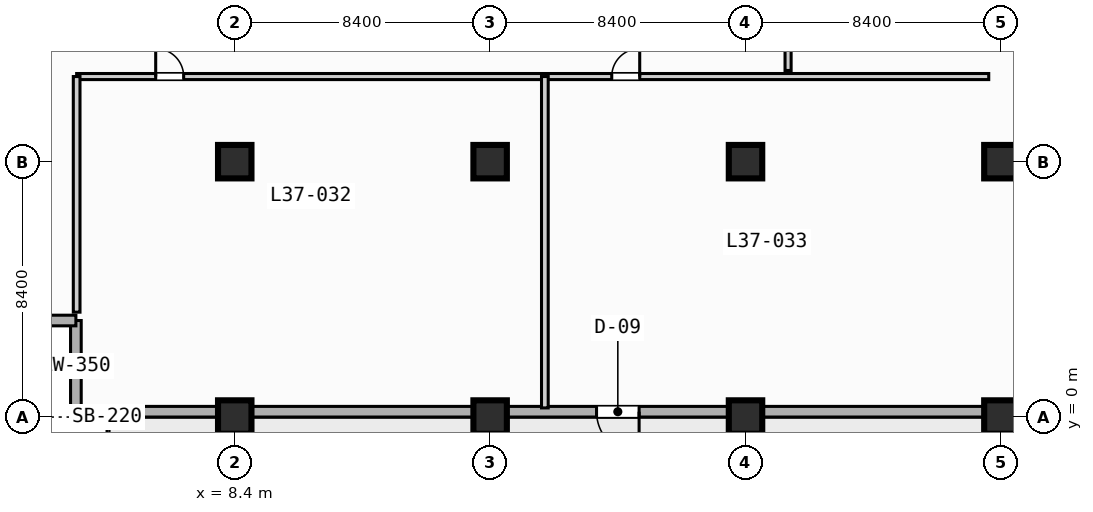
"""IFC4 building model, lengths in metres.
Left out: names, types, materials, properties, quantities, classifications, styles, units other than length and angle.
Written with IfcOpenShell. Run it as: python <this file> out.ifc"""

import sys

from ifc_helpers import new_model, si_unit, direction, frame, frame_2d, origin, origin_2d, place, context, subcontext, project, spatial, rectangle, extrude, element, fill, save


model = new_model("IFC4")
c1 = context("Model", 3, precision=1e-05, world=origin(), true_north=direction((0.0, 1.0)))
c2 = subcontext(c1, "Body", "Model", "MODEL_VIEW")
j1 = project(units=[si_unit("LENGTHUNIT", "METRE"), si_unit("PLANEANGLEUNIT", "RADIAN")], contexts=[c1])
p1 = place(None, origin())
s1 = spatial("IfcSite", under=j1, at=p1, CompositionType="ELEMENT")
p2 = place(p1, origin())
s2 = spatial("IfcBuilding", under=s1, at=p2, CompositionType="ELEMENT")
p3 = place(p2, frame((0.0, 0.0, 153.2)))
s3 = spatial("IfcBuildingStorey", under=s2, at=p3, CompositionType="ELEMENT", Elevation=153.2)
for number, where, z_axis, x_axis in (
    (1, (8.4, 0.0, 0.0), (0.0, 0.0, 1.0), (1.0, 0.0, 0.0)),
    (2, (8.4, 8.4, 0.0), (0.0, 0.0, 1.0), (1.0, 0.0, 0.0)),
    (3, (16.8, 0.0, 0.0), (0.0, 0.0, 1.0), (1.0, 0.0, 0.0)),
    (4, (16.8, 8.4, 0.0), (0.0, 0.0, 1.0), (1.0, 0.0, 0.0)),
    (5, (25.2, 0.0, 0.0), (0.0, 0.0, 1.0), (1.0, 0.0, 0.0)),
    (6, (25.2, 8.4, 0.0), (0.0, 0.0, 1.0), (1.0, 0.0, 0.0)),
    (7, (33.6, 0.0, 0.0), (0.0, 0.0, 1.0), (1.0, 0.0, 0.0)),
    (8, (33.6, 8.4, 0.0), (0.0, 0.0, 1.0), (1.0, 0.0, 0.0)),
):
    element("IfcColumn", number, at=place(p3, frame(where, z_axis=z_axis, x_axis=x_axis)), inside=s3, PredefinedType="COLUMN", context=c2, shape_type="SweptSolid", body=[
        extrude(rectangle(XDim=1.1, YDim=1.1, at=origin_2d()), origin(), (0.0, 0.0, 1.0), 4.4),
    ])
for number, where, z_axis, x_axis in (
    (9, (3.175, 0.175, 0.0), (0.0, 0.0, 1.0), (0.0, 1.0, 0.0)),
    (10, (3.175, 3.175, 0.0), (0.0, 0.0, 1.0), (-1.0, 0.0, 0.0)),
):
    element("IfcWall", number, at=place(p3, frame(where, z_axis=z_axis, x_axis=x_axis)), inside=s3, PredefinedType="STANDARD", context=c2, shape_type="SweptSolid", body=[
        extrude(rectangle(XDim=3.0, YDim=0.35, at=frame_2d((1.5, 0.0))), origin(), (0.0, 0.0, 1.0), 4.15),
    ])
p4 = place(p3, frame((72.425, 0.175, 0.0), z_axis=(0.0, 0.0, 1.0), x_axis=(-1.0, 0.0, 0.0)))
e11 = element("IfcWall", 11, at=p4, inside=s3, PredefinedType="STANDARD", context=c2, shape_type="SweptSolid", body=[
    extrude(rectangle(XDim=69.25, YDim=0.35, at=frame_2d((34.625, 0.0))), origin(), (0.0, 0.0, 1.0), 4.15),
])
p5 = place(p4, frame((50.725, 0.0, 0.0)))
e12 = element("IfcOpeningElement", 12, at=p5, cuts=e11, PredefinedType="OPENING", context=c2, shape_type="SweptSolid", body=[
    extrude(rectangle(XDim=1.4, YDim=2.2, at=frame_2d((0.7, 1.1))), frame((0.0, 0.185, 0.0), z_axis=(0.0, -1.0, 0.0), x_axis=(1.0, 0.0, 0.0)), (0.0, 0.0, 1.0), 0.37),
])
p6 = place(p4, frame((24.975, 0.0, 0.85)))
e13 = element("IfcOpeningElement", 13, at=p6, cuts=e11, PredefinedType="OPENING", context=c2, shape_type="SweptSolid", body=[
    extrude(rectangle(XDim=2.5, YDim=2.2, at=frame_2d((1.25, 1.1))), frame((0.0, 0.185, 0.0), z_axis=(0.0, -1.0, 0.0), x_axis=(1.0, 0.0, 0.0)), (0.0, 0.0, 1.0), 0.37),
])
p7 = place(p4, frame((8.175, 0.0, 0.85)))
e14 = element("IfcOpeningElement", 14, at=p7, cuts=e11, PredefinedType="OPENING", context=c2, shape_type="SweptSolid", body=[
    extrude(rectangle(XDim=2.5, YDim=2.2, at=frame_2d((1.25, 1.1))), frame((0.0, 0.185, 0.0), z_axis=(0.0, -1.0, 0.0), x_axis=(1.0, 0.0, 0.0)), (0.0, 0.0, 1.0), 0.37),
])
p8 = place(p3, frame((3.2, 11.2, 0.0), z_axis=(0.0, 0.0, 1.0), x_axis=(1.0, 0.0, 0.0)))
e15 = element("IfcWall", 15, at=p8, inside=s3, PredefinedType="PARTITIONING", context=c2, shape_type="SweptSolid", body=[
    extrude(rectangle(XDim=30.0, YDim=0.2, at=frame_2d((15.0, 0.0))), origin(), (0.0, 0.0, 1.0), 4.15),
])
p9 = place(p8, frame((2.6, 0.0, 0.0)))
e16 = element("IfcOpeningElement", 16, at=p9, cuts=e15, PredefinedType="OPENING", context=c2, shape_type="SweptSolid", body=[
    extrude(rectangle(XDim=0.92, YDim=2.1, at=frame_2d((0.46, 1.05))), frame((0.0, 0.11, 0.0), z_axis=(0.0, -1.0, 0.0), x_axis=(1.0, 0.0, 0.0)), (0.0, 0.0, 1.0), 0.22),
])
p10 = place(p8, frame((17.6, 0.0, 0.0)))
e17 = element("IfcOpeningElement", 17, at=p10, cuts=e15, PredefinedType="OPENING", context=c2, shape_type="SweptSolid", body=[
    extrude(rectangle(XDim=0.92, YDim=2.1, at=frame_2d((0.46, 1.05))), frame((0.0, 0.11, 0.0), z_axis=(0.0, -1.0, 0.0), x_axis=(1.0, 0.0, 0.0)), (0.0, 0.0, 1.0), 0.22),
])
p11 = place(p3, frame((3.2, 3.45, 0.0), z_axis=(0.0, 0.0, 1.0), x_axis=(0.0, 1.0, 0.0)))
e18 = element("IfcWall", 18, at=p11, inside=s3, PredefinedType="PARTITIONING", context=c2, shape_type="SweptSolid", body=[
    extrude(rectangle(XDim=7.75, YDim=0.22, at=frame_2d((3.875, 0.0))), origin(), (0.0, 0.0, 1.0), 4.15),
])
p12 = place(p3, frame((18.6, 0.3, 0.0), z_axis=(0.0, 0.0, 1.0), x_axis=(0.0, 1.0, 0.0)))
e19 = element("IfcWall", 19, at=p12, inside=s3, PredefinedType="PARTITIONING", context=c2, shape_type="SweptSolid", body=[
    extrude(rectangle(XDim=10.9, YDim=0.22, at=frame_2d((5.45, 0.0))), origin(), (0.0, 0.0, 1.0), 4.15),
])
p13 = place(p3, frame((26.6, 11.4, 0.0), z_axis=(0.0, 0.0, 1.0), x_axis=(0.0, 1.0, 0.0)))
e20 = element("IfcWall", 20, at=p13, inside=s3, PredefinedType="PARTITIONING", context=c2, shape_type="SweptSolid", body=[
    extrude(rectangle(XDim=27.8, YDim=0.2, at=frame_2d((13.9, 0.0))), origin(), (0.0, 0.0, 1.0), 4.15),
])
p14 = place(p13, frame((2.2, 0.0, 0.0)))
e21 = element("IfcOpeningElement", 21, at=p14, cuts=e20, PredefinedType="OPENING", context=c2, shape_type="SweptSolid", body=[
    extrude(rectangle(XDim=0.92, YDim=2.1, at=frame_2d((0.46, 1.05))), frame((0.0, 0.11, 0.0), z_axis=(0.0, -1.0, 0.0), x_axis=(1.0, 0.0, 0.0)), (0.0, 0.0, 1.0), 0.22),
])
p15 = place(p13, frame((14.8, 0.0, 0.0)))
e22 = element("IfcOpeningElement", 22, at=p15, cuts=e20, PredefinedType="OPENING", context=c2, shape_type="SweptSolid", body=[
    extrude(rectangle(XDim=0.92, YDim=2.1, at=frame_2d((0.46, 1.05))), frame((0.0, 0.11, 0.0), z_axis=(0.0, -1.0, 0.0), x_axis=(1.0, 0.0, 0.0)), (0.0, 0.0, 1.0), 0.22),
])
p16 = place(p5, origin())
e23 = element("IfcDoor", 23, at=p16, inside=s3, OperationType="SINGLE_SWING_LEFT", PredefinedType="DOOR", context=c2, shape_type="SweptSolid", body=[
    extrude(rectangle(XDim=1.4, YDim=2.2, at=frame_2d((0.7, 1.1))), frame((0.0, 0.025, 0.0), z_axis=(0.0, -1.0, 0.0), x_axis=(1.0, 0.0, 0.0)), (0.0, 0.0, 1.0), 0.05),
])
fill(e12, e23)
p17 = place(p9, origin())
e24 = element("IfcDoor", 24, at=p17, inside=s3, OperationType="SINGLE_SWING_LEFT", PredefinedType="DOOR", context=c2, shape_type="SweptSolid", body=[
    extrude(rectangle(XDim=0.92, YDim=2.1, at=frame_2d((0.46, 1.05))), frame((0.0, 0.025, 0.0), z_axis=(0.0, -1.0, 0.0), x_axis=(1.0, 0.0, 0.0)), (0.0, 0.0, 1.0), 0.05),
])
fill(e16, e24)
p18 = place(p10, origin())
e25 = element("IfcDoor", 25, at=p18, inside=s3, OperationType="SINGLE_SWING_RIGHT", PredefinedType="DOOR", context=c2, shape_type="SweptSolid", body=[
    extrude(rectangle(XDim=0.92, YDim=2.1, at=frame_2d((0.46, 1.05))), frame((0.0, 0.025, 0.0), z_axis=(0.0, -1.0, 0.0), x_axis=(1.0, 0.0, 0.0)), (0.0, 0.0, 1.0), 0.05),
])
fill(e17, e25)
save(model, sys.argv[1])
